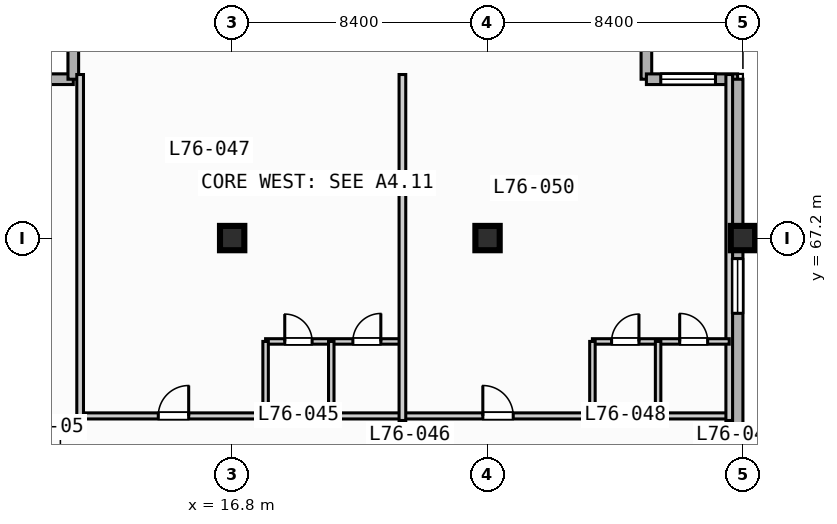
"""IFC4 building model, lengths in metres.
Left out: names, types, materials, properties, quantities, classifications, styles, units other than length and angle.
Written with IfcOpenShell. Run it as: python <this file> out.ifc"""

import sys

from ifc_helpers import new_model, si_unit, direction, frame, frame_2d, origin, origin_2d, place, context, subcontext, project, spatial, rectangle, extrude, element, fill, save


model = new_model("IFC4")
c1 = context("Model", 3, precision=1e-05, world=origin(), true_north=direction((0.0, 1.0)))
c2 = subcontext(c1, "Body", "Model", "MODEL_VIEW")
j1 = project(units=[si_unit("LENGTHUNIT", "METRE"), si_unit("PLANEANGLEUNIT", "RADIAN")], contexts=[c1])
p1 = place(None, origin())
s1 = spatial("IfcSite", under=j1, at=p1, CompositionType="ELEMENT")
p2 = place(p1, origin())
s2 = spatial("IfcBuilding", under=s1, at=p2, CompositionType="ELEMENT")
p3 = place(p2, frame((0.0, 0.0, 308.6)))
s3 = spatial("IfcBuildingStorey", under=s2, at=p3, CompositionType="ELEMENT", Elevation=308.6)
for number, where, z_axis, x_axis in (
    (1, (16.8, 67.2, 0.0), (0.0, 0.0, 1.0), (1.0, 0.0, 0.0)),
    (2, (25.2, 67.2, 0.0), (0.0, 0.0, 1.0), (1.0, 0.0, 0.0)),
    (3, (33.6, 67.2, 0.0), (0.0, 0.0, 1.0), (1.0, 0.0, 0.0)),
):
    element("IfcColumn", number, at=place(p3, frame(where, z_axis=z_axis, x_axis=x_axis)), inside=s3, PredefinedType="COLUMN", context=c2, shape_type="SweptSolid", body=[
        extrude(rectangle(XDim=0.8, YDim=0.8, at=origin_2d()), origin(), (0.0, 0.0, 1.0), 3.9),
    ])
for number, where, z_axis, x_axis in (
    (4, (8.575, 72.425, 0.0), (0.0, 0.0, 1.0), (1.0, 0.0, 0.0)),
    (5, (11.575, 72.425, 0.0), (0.0, 0.0, 1.0), (0.0, 1.0, 0.0)),
    (6, (30.425, 75.425, 0.0), (0.0, 0.0, 1.0), (0.0, -1.0, 0.0)),
):
    element("IfcWall", number, at=place(p3, frame(where, z_axis=z_axis, x_axis=x_axis)), inside=s3, PredefinedType="STANDARD", context=c2, shape_type="SweptSolid", body=[
        extrude(rectangle(XDim=3.0, YDim=0.35, at=frame_2d((1.5, 0.0))), origin(), (0.0, 0.0, 1.0), 3.67),
    ])
p4 = place(p3, frame((30.425, 72.425, 0.0), z_axis=(0.0, 0.0, 1.0), x_axis=(1.0, 0.0, 0.0)))
e7 = element("IfcWall", 7, at=p4, inside=s3, PredefinedType="STANDARD", context=c2, shape_type="SweptSolid", body=[
    extrude(rectangle(XDim=3.0, YDim=0.35, at=frame_2d((1.5, 0.0))), origin(), (0.0, 0.0, 1.0), 3.67),
])
p5 = place(p4, frame((0.472, 0.0, 0.85)))
e8 = element("IfcOpeningElement", 8, at=p5, cuts=e7, PredefinedType="OPENING", context=c2, shape_type="SweptSolid", body=[
    extrude(rectangle(XDim=1.8, YDim=1.8, at=frame_2d((0.9, 0.9))), frame((0.0, 0.185, 0.0), z_axis=(0.0, -1.0, 0.0), x_axis=(1.0, 0.0, 0.0)), (0.0, 0.0, 1.0), 0.37),
])
p6 = place(p3, frame((33.425, 72.425, 0.0), z_axis=(0.0, 0.0, 1.0), x_axis=(0.0, -1.0, 0.0)))
e9 = element("IfcWall", 9, at=p6, inside=s3, PredefinedType="STANDARD", context=c2, shape_type="SweptSolid", body=[
    extrude(rectangle(XDim=39.0, YDim=0.35, at=frame_2d((19.5, 0.0))), origin(), (0.0, 0.0, 1.0), 3.67),
])
p7 = place(p6, frame((5.9, 0.0, 0.85)))
e10 = element("IfcOpeningElement", 10, at=p7, cuts=e9, PredefinedType="OPENING", context=c2, shape_type="SweptSolid", body=[
    extrude(rectangle(XDim=1.8, YDim=1.8, at=frame_2d((0.9, 0.9))), frame((0.0, 0.185, 0.0), z_axis=(0.0, -1.0, 0.0), x_axis=(1.0, 0.0, 0.0)), (0.0, 0.0, 1.0), 0.37),
])
p8 = place(p3, frame((11.8, 61.35, 0.0), z_axis=(0.0, 0.0, 1.0), x_axis=(1.0, 0.0, 0.0)))
e11 = element("IfcWall", 11, at=p8, inside=s3, PredefinedType="PARTITIONING", context=c2, shape_type="SweptSolid", body=[
    extrude(rectangle(XDim=21.35, YDim=0.2, at=frame_2d((10.675, 0.0))), origin(), (0.0, 0.0, 1.0), 3.67),
])
p9 = place(p8, frame((2.57, 0.0, 0.0)))
e12 = element("IfcOpeningElement", 12, at=p9, cuts=e11, PredefinedType="OPENING", context=c2, shape_type="SweptSolid", body=[
    extrude(rectangle(XDim=1.0, YDim=2.15, at=frame_2d((0.5, 1.075))), frame((0.0, 0.11, 0.0), z_axis=(0.0, -1.0, 0.0), x_axis=(1.0, 0.0, 0.0)), (0.0, 0.0, 1.0), 0.22),
])
p10 = place(p8, frame((13.245, 0.0, 0.0)))
e13 = element("IfcOpeningElement", 13, at=p10, cuts=e11, PredefinedType="OPENING", context=c2, shape_type="SweptSolid", body=[
    extrude(rectangle(XDim=1.0, YDim=2.15, at=frame_2d((0.5, 1.075))), frame((0.0, 0.11, 0.0), z_axis=(0.0, -1.0, 0.0), x_axis=(1.0, 0.0, 0.0)), (0.0, 0.0, 1.0), 0.22),
])
p11 = place(p3, frame((11.8, 61.2, 0.0), z_axis=(0.0, 0.0, 1.0), x_axis=(0.0, 1.0, 0.0)))
e14 = element("IfcWall", 14, at=p11, inside=s3, PredefinedType="PARTITIONING", context=c2, shape_type="SweptSolid", body=[
    extrude(rectangle(XDim=11.38, YDim=0.22, at=frame_2d((5.69, 0.0))), origin(), (0.0, 0.0, 1.0), 3.67),
])
p12 = place(p3, frame((17.9, 63.8, 0.0), z_axis=(0.0, 0.0, 1.0), x_axis=(1.0, 0.0, 0.0)))
e15 = element("IfcWall", 15, at=p12, inside=s3, PredefinedType="PLUMBINGWALL", context=c2, shape_type="SweptSolid", body=[
    extrude(rectangle(XDim=4.5, YDim=0.18, at=frame_2d((2.25, 0.0))), origin(), (0.0, 0.0, 1.0), 3.67),
])
p13 = place(p12, frame((0.63, 0.0, 0.0)))
e16 = element("IfcOpeningElement", 16, at=p13, cuts=e15, PredefinedType="OPENING", context=c2, shape_type="SweptSolid", body=[
    extrude(rectangle(XDim=0.9, YDim=2.1, at=frame_2d((0.45, 1.05))), frame((0.0, 0.1, 0.0), z_axis=(0.0, -1.0, 0.0), x_axis=(1.0, 0.0, 0.0)), (0.0, 0.0, 1.0), 0.2),
])
p14 = place(p12, frame((2.87, 0.0, 0.0)))
e17 = element("IfcOpeningElement", 17, at=p14, cuts=e15, PredefinedType="OPENING", context=c2, shape_type="SweptSolid", body=[
    extrude(rectangle(XDim=0.92, YDim=2.1, at=frame_2d((0.46, 1.05))), frame((0.0, 0.1, 0.0), z_axis=(0.0, -1.0, 0.0), x_axis=(1.0, 0.0, 0.0)), (0.0, 0.0, 1.0), 0.2),
])
for number, where, z_axis, x_axis in (
    (18, (17.9, 61.35, 0.0), (0.0, 0.0, 1.0), (0.0, 1.0, 0.0)),
    (19, (20.06, 61.35, 0.0), (0.0, 0.0, 1.0), (0.0, 1.0, 0.0)),
):
    element("IfcWall", number, at=place(p3, frame(where, z_axis=z_axis, x_axis=x_axis)), inside=s3, PredefinedType="PLUMBINGWALL", context=c2, shape_type="SweptSolid", body=[
        extrude(rectangle(XDim=2.45, YDim=0.18, at=frame_2d((1.225, 0.0))), origin(), (0.0, 0.0, 1.0), 3.67),
    ])
for number, where, z_axis, x_axis in (
    (20, (22.4, 61.2, 0.0), (0.0, 0.0, 1.0), (0.0, 1.0, 0.0)),
    (21, (33.15, 61.2, 0.0), (0.0, 0.0, 1.0), (0.0, 1.0, 0.0)),
):
    element("IfcWall", number, at=place(p3, frame(where, z_axis=z_axis, x_axis=x_axis)), inside=s3, PredefinedType="PARTITIONING", context=c2, shape_type="SweptSolid", body=[
        extrude(rectangle(XDim=11.38, YDim=0.22, at=frame_2d((5.69, 0.0))), origin(), (0.0, 0.0, 1.0), 3.67),
    ])
p15 = place(p3, frame((28.65, 63.8, 0.0), z_axis=(0.0, 0.0, 1.0), x_axis=(1.0, 0.0, 0.0)))
e22 = element("IfcWall", 22, at=p15, inside=s3, PredefinedType="PLUMBINGWALL", context=c2, shape_type="SweptSolid", body=[
    extrude(rectangle(XDim=4.5, YDim=0.18, at=frame_2d((2.25, 0.0))), origin(), (0.0, 0.0, 1.0), 3.67),
])
p16 = place(p15, frame((0.63, 0.0, 0.0)))
e23 = element("IfcOpeningElement", 23, at=p16, cuts=e22, PredefinedType="OPENING", context=c2, shape_type="SweptSolid", body=[
    extrude(rectangle(XDim=0.9, YDim=2.1, at=frame_2d((0.45, 1.05))), frame((0.0, 0.1, 0.0), z_axis=(0.0, -1.0, 0.0), x_axis=(1.0, 0.0, 0.0)), (0.0, 0.0, 1.0), 0.2),
])
p17 = place(p15, frame((2.87, 0.0, 0.0)))
e24 = element("IfcOpeningElement", 24, at=p17, cuts=e22, PredefinedType="OPENING", context=c2, shape_type="SweptSolid", body=[
    extrude(rectangle(XDim=0.92, YDim=2.1, at=frame_2d((0.46, 1.05))), frame((0.0, 0.1, 0.0), z_axis=(0.0, -1.0, 0.0), x_axis=(1.0, 0.0, 0.0)), (0.0, 0.0, 1.0), 0.2),
])
for number, where, z_axis, x_axis in (
    (25, (28.65, 61.35, 0.0), (0.0, 0.0, 1.0), (0.0, 1.0, 0.0)),
    (26, (30.81, 61.35, 0.0), (0.0, 0.0, 1.0), (0.0, 1.0, 0.0)),
):
    element("IfcWall", number, at=place(p3, frame(where, z_axis=z_axis, x_axis=x_axis)), inside=s3, PredefinedType="PLUMBINGWALL", context=c2, shape_type="SweptSolid", body=[
        extrude(rectangle(XDim=2.45, YDim=0.18, at=frame_2d((1.225, 0.0))), origin(), (0.0, 0.0, 1.0), 3.67),
    ])
p18 = place(p5, origin())
e27 = element("IfcWindow", 27, at=p18, inside=s3, PartitioningType="SINGLE_PANEL", PredefinedType="WINDOW", context=c2, shape_type="SweptSolid", body=[
    extrude(rectangle(XDim=1.8, YDim=1.8, at=frame_2d((0.9, 0.9))), frame((0.0, 0.03, 0.0), z_axis=(0.0, -1.0, 0.0), x_axis=(1.0, 0.0, 0.0)), (0.0, 0.0, 1.0), 0.06),
])
fill(e8, e27)
p19 = place(p7, origin())
e28 = element("IfcWindow", 28, at=p19, inside=s3, PartitioningType="SINGLE_PANEL", PredefinedType="WINDOW", context=c2, shape_type="SweptSolid", body=[
    extrude(rectangle(XDim=1.8, YDim=1.8, at=frame_2d((0.9, 0.9))), frame((0.0, 0.03, 0.0), z_axis=(0.0, -1.0, 0.0), x_axis=(1.0, 0.0, 0.0)), (0.0, 0.0, 1.0), 0.06),
])
fill(e10, e28)
p20 = place(p9, origin())
e29 = element("IfcDoor", 29, at=p20, inside=s3, OperationType="SINGLE_SWING_RIGHT", PredefinedType="DOOR", context=c2, shape_type="SweptSolid", body=[
    extrude(rectangle(XDim=1.0, YDim=2.15, at=frame_2d((0.5, 1.075))), frame((0.0, 0.025, 0.0), z_axis=(0.0, -1.0, 0.0), x_axis=(1.0, 0.0, 0.0)), (0.0, 0.0, 1.0), 0.05),
])
fill(e12, e29)
p21 = place(p10, origin())
e30 = element("IfcDoor", 30, at=p21, inside=s3, OperationType="SINGLE_SWING_LEFT", PredefinedType="DOOR", context=c2, shape_type="SweptSolid", body=[
    extrude(rectangle(XDim=1.0, YDim=2.15, at=frame_2d((0.5, 1.075))), frame((0.0, 0.025, 0.0), z_axis=(0.0, -1.0, 0.0), x_axis=(1.0, 0.0, 0.0)), (0.0, 0.0, 1.0), 0.05),
])
fill(e13, e30)
p22 = place(p13, origin())
e31 = element("IfcDoor", 31, at=p22, inside=s3, OperationType="SINGLE_SWING_LEFT", PredefinedType="DOOR", context=c2, shape_type="SweptSolid", body=[
    extrude(rectangle(XDim=0.9, YDim=2.1, at=frame_2d((0.45, 1.05))), frame((0.0, 0.025, 0.0), z_axis=(0.0, -1.0, 0.0), x_axis=(1.0, 0.0, 0.0)), (0.0, 0.0, 1.0), 0.05),
])
fill(e16, e31)
p23 = place(p14, origin())
e32 = element("IfcDoor", 32, at=p23, inside=s3, OperationType="SINGLE_SWING_RIGHT", PredefinedType="DOOR", context=c2, shape_type="SweptSolid", body=[
    extrude(rectangle(XDim=0.92, YDim=2.1, at=frame_2d((0.46, 1.05))), frame((0.0, 0.025, 0.0), z_axis=(0.0, -1.0, 0.0), x_axis=(1.0, 0.0, 0.0)), (0.0, 0.0, 1.0), 0.05),
])
fill(e17, e32)
p24 = place(p16, origin())
e33 = element("IfcDoor", 33, at=p24, inside=s3, OperationType="SINGLE_SWING_RIGHT", PredefinedType="DOOR", context=c2, shape_type="SweptSolid", body=[
    extrude(rectangle(XDim=0.9, YDim=2.1, at=frame_2d((0.45, 1.05))), frame((0.0, 0.025, 0.0), z_axis=(0.0, -1.0, 0.0), x_axis=(1.0, 0.0, 0.0)), (0.0, 0.0, 1.0), 0.05),
])
fill(e23, e33)
p25 = place(p17, origin())
e34 = element("IfcDoor", 34, at=p25, inside=s3, OperationType="SINGLE_SWING_LEFT", PredefinedType="DOOR", context=c2, shape_type="SweptSolid", body=[
    extrude(rectangle(XDim=0.92, YDim=2.1, at=frame_2d((0.46, 1.05))), frame((0.0, 0.025, 0.0), z_axis=(0.0, -1.0, 0.0), x_axis=(1.0, 0.0, 0.0)), (0.0, 0.0, 1.0), 0.05),
])
fill(e24, e34)
save(model, sys.argv[1])
